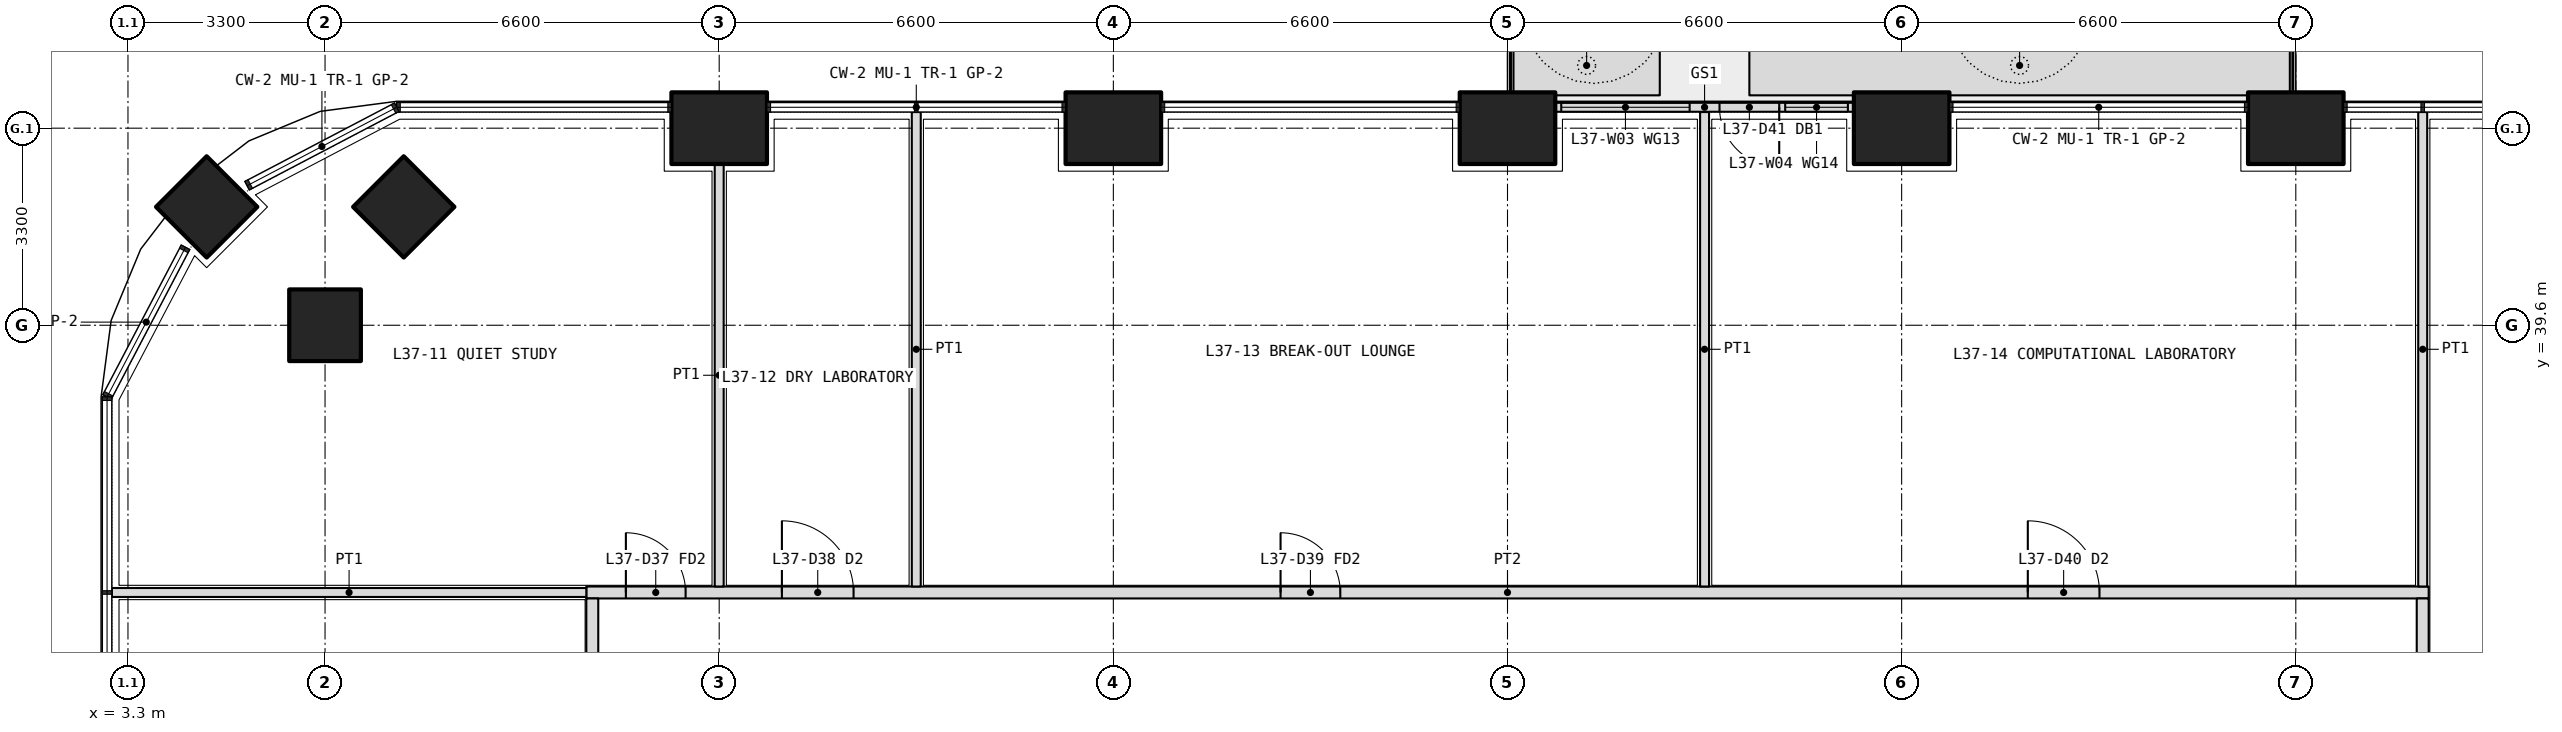
"""IFC4 building model, lengths in metres.
Left out: names, types, materials, properties, quantities, classifications, styles, units other than length and angle.
Written with IfcOpenShell. Run it as: python <this file> out.ifc"""

import sys

from ifc_helpers import new_model, si_unit, direction, frame, frame_2d, origin, origin_2d, place, context, subcontext, project, spatial, polyline, rectangle, outline, extrude, element, fill, save


model = new_model("IFC4")
c1 = context("Model", 3, precision=1e-05, world=origin(), true_north=direction((0.0, 1.0)))
c2 = subcontext(c1, "Body", "Model", "MODEL_VIEW")
j1 = project(units=[si_unit("LENGTHUNIT", "METRE"), si_unit("PLANEANGLEUNIT", "RADIAN")], contexts=[c1])
p1 = place(None, origin())
s1 = spatial("IfcSite", under=j1, at=p1, CompositionType="ELEMENT")
p2 = place(p1, origin())
s2 = spatial("IfcBuilding", under=s1, at=p2, CompositionType="ELEMENT")
p3 = place(p2, frame((0.0, 0.0, 164.1)))
s3 = spatial("IfcBuildingStorey", under=s2, at=p3, CompositionType="ELEMENT", Elevation=164.1)
p4 = place(p3, frame((4.618, 41.582, 0.0), z_axis=(0.0, 0.0, 1.0), x_axis=(0.707106781187, 0.707106781187, 0.0)))
e1 = element("IfcColumn", 1, at=p4, inside=s3, PredefinedType="COLUMN", context=c2, shape_type="SweptSolid", body=[
    extrude(rectangle(XDim=1.2, YDim=1.2, at=origin_2d()), origin(), (0.0, 0.0, 1.0), 4.2),
])
for number, where, z_axis, x_axis in (
    (2, (13.2, 42.9, 0.0), (0.0, 0.0, 1.0), (1.0, 0.0, 0.0)),
    (3, (19.8, 42.9, 0.0), (0.0, 0.0, 1.0), (1.0, 0.0, 0.0)),
    (4, (26.4, 42.9, 0.0), (0.0, 0.0, 1.0), (1.0, 0.0, 0.0)),
    (5, (33.0, 42.9, 0.0), (0.0, 0.0, 1.0), (1.0, 0.0, 0.0)),
    (6, (39.6, 42.9, 0.0), (0.0, 0.0, 1.0), (1.0, 0.0, 0.0)),
):
    element("IfcColumn", number, at=place(p3, frame(where, z_axis=z_axis, x_axis=x_axis)), inside=s3, PredefinedType="COLUMN", context=c2, shape_type="SweptSolid", body=[
        extrude(rectangle(XDim=1.6, YDim=1.2, at=origin_2d()), origin(), (0.0, 0.0, 1.0), 4.2),
    ])
for number, where, z_axis, x_axis in (
    (7, (6.6, 39.6, 0.0), (0.0, 0.0, 1.0), (1.0, 0.0, 0.0)),
    (8, (7.918, 41.582, 0.0), (0.0, 0.0, 1.0), (0.707, 0.707, 0.0)),
):
    element("IfcColumn", number, at=place(p3, frame(where, z_axis=z_axis, x_axis=x_axis)), inside=s3, PredefinedType="COLUMN", context=c2, shape_type="SweptSolid", body=[
        extrude(rectangle(XDim=1.2, YDim=1.2, at=origin_2d()), origin(), (0.0, 0.0, 1.0), 4.2),
    ])
p5 = place(p3, origin())
e9 = element("IfcWall", 9, at=p5, inside=s3, PredefinedType="USERDEFINED", context=c2, shape_type="SweptSolid", body=[
    extrude(outline(polyline([(26.5, 43.45), (28.95, 43.45), (28.95, 44.45), (26.5, 44.45), (26.5, 43.45)]), holes=[polyline([(26.65, 43.6), (28.8, 43.6), (28.8, 44.3), (26.65, 44.3), (26.65, 43.6)])]), origin(), (0.0, 0.0, 1.0), 1.05),
])
p6 = place(p3, origin())
e10 = element("IfcWall", 10, at=p6, inside=s3, PredefinedType="USERDEFINED", context=c2, shape_type="SweptSolid", body=[
    extrude(outline(polyline([(30.45, 43.45), (39.5, 43.45), (39.5, 44.45), (30.45, 44.45), (30.45, 43.45)]), holes=[polyline([(30.6, 43.6), (39.35, 43.6), (39.35, 44.3), (30.6, 44.3), (30.6, 43.6)])]), origin(), (0.0, 0.0, 1.0), 1.05),
])
p7 = place(p3, frame((32.2, 43.25, 0.0), z_axis=(0.0, 0.0, 1.0), x_axis=(-1.0, 0.0, 0.0)))
e11 = element("IfcWall", 11, at=p7, inside=s3, PredefinedType="SOLIDWALL", context=c2, shape_type="SweptSolid", body=[
    extrude(rectangle(XDim=5.0, YDim=0.15, at=frame_2d((2.5, 0.0))), origin(), (0.0, 0.0, 1.0), 2.7),
])
p8 = place(p7, frame((1.25, 0.0, 0.0)))
e12 = element("IfcOpeningElement", 12, at=p8, cuts=e11, PredefinedType="OPENING", context=c2, shape_type="SweptSolid", body=[
    extrude(rectangle(XDim=1.0, YDim=2.4, at=frame_2d((0.5, 1.2))), frame((0.0, 0.085, 0.0), z_axis=(0.0, -1.0, 0.0), x_axis=(1.0, 0.0, 0.0)), (0.0, 0.0, 1.0), 0.17),
])
p9 = place(p7, frame((0.1, 0.0, 0.1)))
e13 = element("IfcOpeningElement", 13, at=p9, cuts=e11, PredefinedType="OPENING", context=c2, shape_type="SweptSolid", body=[
    extrude(rectangle(XDim=1.05, YDim=2.3, at=frame_2d((0.525, 1.15))), frame((0.0, 0.085, 0.0), z_axis=(0.0, -1.0, 0.0), x_axis=(1.0, 0.0, 0.0)), (0.0, 0.0, 1.0), 0.17),
])
p10 = place(p7, frame((2.75, 0.0, 0.1)))
e14 = element("IfcOpeningElement", 14, at=p10, cuts=e11, PredefinedType="OPENING", context=c2, shape_type="SweptSolid", body=[
    extrude(rectangle(XDim=2.15, YDim=2.3, at=frame_2d((1.075, 1.15))), frame((0.0, 0.085, 0.0), z_axis=(0.0, -1.0, 0.0), x_axis=(1.0, 0.0, 0.0)), (0.0, 0.0, 1.0), 0.17),
])
p11 = place(p3, frame((10.975, 35.125, 0.0), z_axis=(0.0, 0.0, 1.0), x_axis=(1.0, 0.0, 0.0)))
e15 = element("IfcWall", 15, at=p11, inside=s3, PredefinedType="PARTITIONING", context=c2, shape_type="SweptSolid", body=[
    extrude(rectangle(XDim=30.85, YDim=0.2, at=frame_2d((15.425, 0.0))), origin(), (0.0, 0.0, 1.0), 2.85),
])
p12 = place(p11, frame((0.663, 0.0, 0.0)))
e16 = element("IfcOpeningElement", 16, at=p12, cuts=e15, PredefinedType="OPENING", context=c2, shape_type="SweptSolid", body=[
    extrude(rectangle(XDim=1.0, YDim=2.1, at=frame_2d((0.5, 1.05))), frame((0.0, 0.11, 0.0), z_axis=(0.0, -1.0, 0.0), x_axis=(1.0, 0.0, 0.0)), (0.0, 0.0, 1.0), 0.22),
])
p13 = place(p11, frame((3.275, 0.0, 0.0)))
e17 = element("IfcOpeningElement", 17, at=p13, cuts=e15, PredefinedType="OPENING", context=c2, shape_type="SweptSolid", body=[
    extrude(rectangle(XDim=1.2, YDim=2.1, at=frame_2d((0.6, 1.05))), frame((0.0, 0.11, 0.0), z_axis=(0.0, -1.0, 0.0), x_axis=(1.0, 0.0, 0.0)), (0.0, 0.0, 1.0), 0.22),
])
p14 = place(p11, frame((11.625, 0.0, 0.0)))
e18 = element("IfcOpeningElement", 18, at=p14, cuts=e15, PredefinedType="OPENING", context=c2, shape_type="SweptSolid", body=[
    extrude(rectangle(XDim=1.0, YDim=2.1, at=frame_2d((0.5, 1.05))), frame((0.0, 0.11, 0.0), z_axis=(0.0, -1.0, 0.0), x_axis=(1.0, 0.0, 0.0)), (0.0, 0.0, 1.0), 0.22),
])
p15 = place(p11, frame((24.137, 0.0, 0.0)))
e19 = element("IfcOpeningElement", 19, at=p15, cuts=e15, PredefinedType="OPENING", context=c2, shape_type="SweptSolid", body=[
    extrude(rectangle(XDim=1.2, YDim=2.1, at=frame_2d((0.6, 1.05))), frame((0.0, 0.11, 0.0), z_axis=(0.0, -1.0, 0.0), x_axis=(1.0, 0.0, 0.0)), (0.0, 0.0, 1.0), 0.22),
])
p16 = place(p3, frame((11.075, 11.175, 0.0), z_axis=(0.0, 0.0, 1.0), x_axis=(0.0, 1.0, 0.0)))
e20 = element("IfcWall", 20, at=p16, inside=s3, PredefinedType="PARTITIONING", context=c2, shape_type="SweptSolid", body=[
    extrude(rectangle(XDim=23.85, YDim=0.2, at=frame_2d((11.925, 0.0))), origin(), (0.0, 0.0, 1.0), 2.85),
])
p17 = place(p16, frame((0.363, 0.0, 0.0)))
e21 = element("IfcOpeningElement", 21, at=p17, cuts=e20, PredefinedType="OPENING", context=c2, shape_type="SweptSolid", body=[
    extrude(rectangle(XDim=1.2, YDim=2.1, at=frame_2d((0.6, 1.05))), frame((0.0, 0.11, 0.0), z_axis=(0.0, -1.0, 0.0), x_axis=(1.0, 0.0, 0.0)), (0.0, 0.0, 1.0), 0.22),
])
p18 = place(p16, frame((2.575, 0.0, 0.0)))
e22 = element("IfcOpeningElement", 22, at=p18, cuts=e20, PredefinedType="OPENING", context=c2, shape_type="SweptSolid", body=[
    extrude(rectangle(XDim=1.0, YDim=2.1, at=frame_2d((0.5, 1.05))), frame((0.0, 0.11, 0.0), z_axis=(0.0, -1.0, 0.0), x_axis=(1.0, 0.0, 0.0)), (0.0, 0.0, 1.0), 0.22),
])
p19 = place(p16, frame((5.625, 0.0, 0.0)))
e23 = element("IfcOpeningElement", 23, at=p19, cuts=e20, PredefinedType="OPENING", context=c2, shape_type="SweptSolid", body=[
    extrude(rectangle(XDim=0.9, YDim=2.1, at=frame_2d((0.45, 1.05))), frame((0.0, 0.11, 0.0), z_axis=(0.0, -1.0, 0.0), x_axis=(1.0, 0.0, 0.0)), (0.0, 0.0, 1.0), 0.22),
])
p20 = place(p16, frame((9.425, 0.0, 0.0)))
e24 = element("IfcOpeningElement", 24, at=p20, cuts=e20, PredefinedType="OPENING", context=c2, shape_type="SweptSolid", body=[
    extrude(rectangle(XDim=0.9, YDim=2.1, at=frame_2d((0.45, 1.05))), frame((0.0, 0.11, 0.0), z_axis=(0.0, -1.0, 0.0), x_axis=(1.0, 0.0, 0.0)), (0.0, 0.0, 1.0), 0.22),
])
p21 = place(p16, frame((12.975, 0.0, 0.0)))
e25 = element("IfcOpeningElement", 25, at=p21, cuts=e20, PredefinedType="OPENING", context=c2, shape_type="SweptSolid", body=[
    extrude(rectangle(XDim=1.0, YDim=2.1, at=frame_2d((0.5, 1.05))), frame((0.0, 0.11, 0.0), z_axis=(0.0, -1.0, 0.0), x_axis=(1.0, 0.0, 0.0)), (0.0, 0.0, 1.0), 0.22),
])
p22 = place(p16, frame((16.375, 0.0, 0.0)))
e26 = element("IfcOpeningElement", 26, at=p22, cuts=e20, PredefinedType="OPENING", context=c2, shape_type="SweptSolid", body=[
    extrude(rectangle(XDim=1.0, YDim=2.1, at=frame_2d((0.5, 1.05))), frame((0.0, 0.11, 0.0), z_axis=(0.0, -1.0, 0.0), x_axis=(1.0, 0.0, 0.0)), (0.0, 0.0, 1.0), 0.22),
])
p23 = place(p16, frame((20.637, 0.0, 0.0)))
e27 = element("IfcOpeningElement", 27, at=p23, cuts=e20, PredefinedType="OPENING", context=c2, shape_type="SweptSolid", body=[
    extrude(rectangle(XDim=1.2, YDim=2.1, at=frame_2d((0.6, 1.05))), frame((0.0, 0.11, 0.0), z_axis=(0.0, -1.0, 0.0), x_axis=(1.0, 0.0, 0.0)), (0.0, 0.0, 1.0), 0.22),
])
p24 = place(p3, frame((41.725, 11.175, 0.0), z_axis=(0.0, 0.0, 1.0), x_axis=(0.0, 1.0, 0.0)))
e28 = element("IfcWall", 28, at=p24, inside=s3, PredefinedType="PARTITIONING", context=c2, shape_type="SweptSolid", body=[
    extrude(rectangle(XDim=23.85, YDim=0.2, at=frame_2d((11.925, 0.0))), origin(), (0.0, 0.0, 1.0), 2.85),
])
p25 = place(p24, frame((3.762, 0.0, 0.0)))
e29 = element("IfcOpeningElement", 29, at=p25, cuts=e28, PredefinedType="OPENING", context=c2, shape_type="SweptSolid", body=[
    extrude(rectangle(XDim=1.0, YDim=2.1, at=frame_2d((0.5, 1.05))), frame((0.0, 0.11, 0.0), z_axis=(0.0, -1.0, 0.0), x_axis=(1.0, 0.0, 0.0)), (0.0, 0.0, 1.0), 0.22),
])
p26 = place(p24, frame((9.625, 0.0, 0.0)))
e30 = element("IfcOpeningElement", 30, at=p26, cuts=e28, PredefinedType="OPENING", context=c2, shape_type="SweptSolid", body=[
    extrude(rectangle(XDim=1.0, YDim=2.1, at=frame_2d((0.5, 1.05))), frame((0.0, 0.11, 0.0), z_axis=(0.0, -1.0, 0.0), x_axis=(1.0, 0.0, 0.0)), (0.0, 0.0, 1.0), 0.22),
])
p27 = place(p24, frame((12.975, 0.0, 0.0)))
e31 = element("IfcOpeningElement", 31, at=p27, cuts=e28, PredefinedType="OPENING", context=c2, shape_type="SweptSolid", body=[
    extrude(rectangle(XDim=0.9, YDim=2.1, at=frame_2d((0.45, 1.05))), frame((0.0, 0.11, 0.0), z_axis=(0.0, -1.0, 0.0), x_axis=(1.0, 0.0, 0.0)), (0.0, 0.0, 1.0), 0.22),
])
p28 = place(p24, frame((19.087, 0.0, 0.0)))
e32 = element("IfcOpeningElement", 32, at=p28, cuts=e28, PredefinedType="OPENING", context=c2, shape_type="SweptSolid", body=[
    extrude(rectangle(XDim=1.0, YDim=2.1, at=frame_2d((0.5, 1.05))), frame((0.0, 0.11, 0.0), z_axis=(0.0, -1.0, 0.0), x_axis=(1.0, 0.0, 0.0)), (0.0, 0.0, 1.0), 0.22),
])
p29 = place(p3, frame((41.725, 43.17, 0.0), z_axis=(0.0, 0.0, 1.0), x_axis=(0.0, -1.0, 0.0)))
e33 = element("IfcWall", 33, at=p29, inside=s3, PredefinedType="PARTITIONING", context=c2, shape_type="SweptSolid", body=[
    extrude(rectangle(XDim=7.945, YDim=0.15, at=frame_2d((3.972, 0.0))), origin(), (0.0, 0.0, 1.0), 2.7),
])
p30 = place(p3, frame((3.03, 35.125, 0.0), z_axis=(0.0, 0.0, 1.0), x_axis=(1.0, 0.0, 0.0)))
e34 = element("IfcWall", 34, at=p30, inside=s3, PredefinedType="PARTITIONING", context=c2, shape_type="SweptSolid", body=[
    extrude(rectangle(XDim=7.945, YDim=0.15, at=frame_2d((3.973, 0.0))), origin(), (0.0, 0.0, 1.0), 2.7),
])
p31 = place(p3, frame((13.2, 42.3, 0.0), z_axis=(0.0, 0.0, 1.0), x_axis=(0.0, -1.0, 0.0)))
e35 = element("IfcWall", 35, at=p31, inside=s3, PredefinedType="PARTITIONING", context=c2, shape_type="SweptSolid", body=[
    extrude(rectangle(XDim=7.075, YDim=0.15, at=frame_2d((3.538, 0.0))), origin(), (0.0, 0.0, 1.0), 2.85),
])
for number, where, z_axis, x_axis in (
    (36, (16.5, 43.17, 0.0), (0.0, 0.0, 1.0), (0.0, -1.0, 0.0)),
    (37, (29.7, 43.17, 0.0), (0.0, 0.0, 1.0), (0.0, -1.0, 0.0)),
):
    element("IfcWall", number, at=place(p3, frame(where, z_axis=z_axis, x_axis=x_axis)), inside=s3, PredefinedType="PARTITIONING", context=c2, shape_type="SweptSolid", body=[
        extrude(rectangle(XDim=7.945, YDim=0.15, at=frame_2d((3.972, 0.0))), origin(), (0.0, 0.0, 1.0), 2.7),
    ])
p32 = place(p8, origin())
e38 = element("IfcDoor", 38, at=p32, inside=s3, OperationType="SINGLE_SWING_LEFT", PredefinedType="DOOR", context=c2, shape_type="SweptSolid", body=[
    extrude(rectangle(XDim=1.0, YDim=2.4, at=frame_2d((0.5, 1.2))), frame((0.0, 0.025, 0.0), z_axis=(0.0, -1.0, 0.0), x_axis=(1.0, 0.0, 0.0)), (0.0, 0.0, 1.0), 0.05),
])
fill(e12, e38)
p33 = place(p9, origin())
e39 = element("IfcWindow", 39, at=p33, inside=s3, PartitioningType="SINGLE_PANEL", PredefinedType="WINDOW", context=c2, shape_type="SweptSolid", body=[
    extrude(rectangle(XDim=1.05, YDim=2.3, at=frame_2d((0.525, 1.15))), frame((0.0, 0.03, 0.0), z_axis=(0.0, -1.0, 0.0), x_axis=(1.0, 0.0, 0.0)), (0.0, 0.0, 1.0), 0.06),
])
fill(e13, e39)
p34 = place(p10, origin())
e40 = element("IfcWindow", 40, at=p34, inside=s3, PartitioningType="SINGLE_PANEL", PredefinedType="WINDOW", context=c2, shape_type="SweptSolid", body=[
    extrude(rectangle(XDim=2.15, YDim=2.3, at=frame_2d((1.075, 1.15))), frame((0.0, 0.03, 0.0), z_axis=(0.0, -1.0, 0.0), x_axis=(1.0, 0.0, 0.0)), (0.0, 0.0, 1.0), 0.06),
])
fill(e14, e40)
p35 = place(p12, origin())
e41 = element("IfcDoor", 41, at=p35, inside=s3, OperationType="SINGLE_SWING_LEFT", PredefinedType="DOOR", context=c2, shape_type="SweptSolid", body=[
    extrude(rectangle(XDim=1.0, YDim=2.1, at=frame_2d((0.5, 1.05))), frame((0.0, 0.025, 0.0), z_axis=(0.0, -1.0, 0.0), x_axis=(1.0, 0.0, 0.0)), (0.0, 0.0, 1.0), 0.05),
])
fill(e16, e41)
p36 = place(p13, origin())
e42 = element("IfcDoor", 42, at=p36, inside=s3, OperationType="DOUBLE_DOOR_SINGLE_SWING", PredefinedType="DOOR", context=c2, shape_type="SweptSolid", body=[
    extrude(rectangle(XDim=1.2, YDim=2.1, at=frame_2d((0.6, 1.05))), frame((0.0, 0.025, 0.0), z_axis=(0.0, -1.0, 0.0), x_axis=(1.0, 0.0, 0.0)), (0.0, 0.0, 1.0), 0.05),
])
fill(e17, e42)
p37 = place(p14, origin())
e43 = element("IfcDoor", 43, at=p37, inside=s3, OperationType="SINGLE_SWING_LEFT", PredefinedType="DOOR", context=c2, shape_type="SweptSolid", body=[
    extrude(rectangle(XDim=1.0, YDim=2.1, at=frame_2d((0.5, 1.05))), frame((0.0, 0.025, 0.0), z_axis=(0.0, -1.0, 0.0), x_axis=(1.0, 0.0, 0.0)), (0.0, 0.0, 1.0), 0.05),
])
fill(e18, e43)
p38 = place(p15, origin())
e44 = element("IfcDoor", 44, at=p38, inside=s3, OperationType="DOUBLE_DOOR_SINGLE_SWING", PredefinedType="DOOR", context=c2, shape_type="SweptSolid", body=[
    extrude(rectangle(XDim=1.2, YDim=2.1, at=frame_2d((0.6, 1.05))), frame((0.0, 0.025, 0.0), z_axis=(0.0, -1.0, 0.0), x_axis=(1.0, 0.0, 0.0)), (0.0, 0.0, 1.0), 0.05),
])
fill(e19, e44)
save(model, sys.argv[1])
